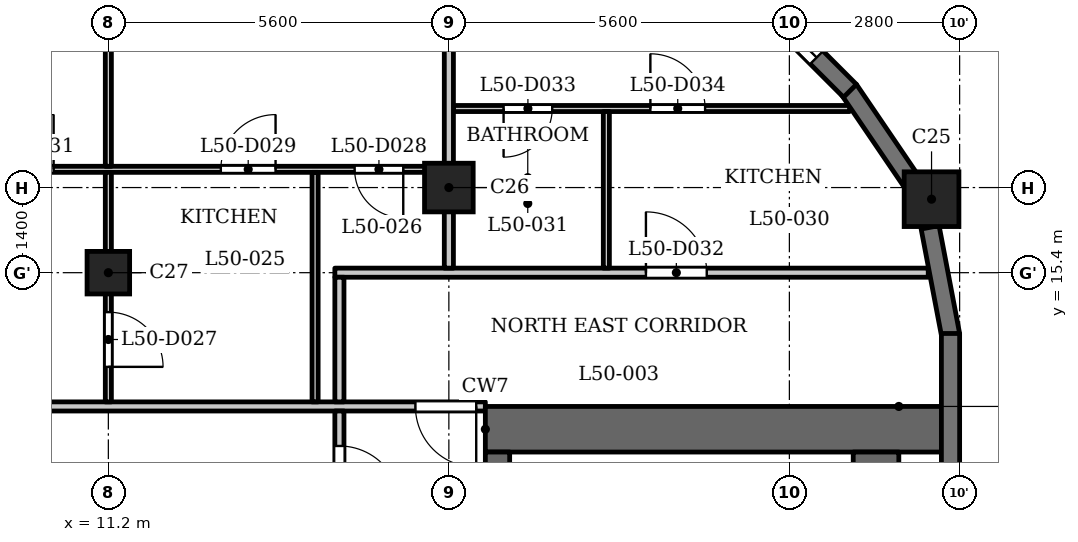
"""IFC4 building model, lengths in metres.
Left out: names, types, materials, properties, quantities, classifications, styles, units other than length and angle.
Written with IfcOpenShell. Run it as: python <this file> out.ifc"""

import sys

from ifc_helpers import new_model, si_unit, direction, frame, frame_2d, origin, origin_2d, place, context, subcontext, project, spatial, rectangle, extrude, element, fill, save


model = new_model("IFC4")
c1 = context("Model", 3, precision=1e-05, world=origin(), true_north=direction((0.0, 1.0)))
c2 = subcontext(c1, "Body", "Model", "MODEL_VIEW")
j1 = project(units=[si_unit("LENGTHUNIT", "METRE"), si_unit("PLANEANGLEUNIT", "RADIAN")], contexts=[c1])
p1 = place(None, origin())
s1 = spatial("IfcSite", under=j1, at=p1, CompositionType="ELEMENT")
p2 = place(p1, origin())
s2 = spatial("IfcBuilding", under=s1, at=p2, CompositionType="ELEMENT")
p3 = place(p2, frame((0.0, 0.0, 195.9)))
s3 = spatial("IfcBuildingStorey", under=s2, at=p3, CompositionType="ELEMENT", Elevation=195.9)
p4 = place(p3, frame((24.738, 16.609, 0.0), z_axis=(0.0, 0.0, 1.0), x_axis=(1.0, 0.0, 0.0)))
e1 = element("IfcColumn", 1, at=p4, inside=s3, PredefinedType="COLUMN", context=c2, shape_type="SweptSolid", body=[
    extrude(rectangle(XDim=0.9, YDim=0.9, at=origin_2d()), origin(), (0.0, 0.0, 1.0), 3.5),
])
p5 = place(p3, frame((16.8, 16.8, 0.0), z_axis=(0.0, 0.0, 1.0), x_axis=(1.0, 0.0, 0.0)))
e2 = element("IfcColumn", 2, at=p5, inside=s3, PredefinedType="COLUMN", context=c2, shape_type="SweptSolid", body=[
    extrude(rectangle(XDim=0.8, YDim=0.8, at=origin_2d()), origin(), (0.0, 0.0, 1.0), 3.5),
])
p6 = place(p3, frame((11.2, 15.4, 0.0), z_axis=(0.0, 0.0, 1.0), x_axis=(1.0, 0.0, 0.0)))
e3 = element("IfcColumn", 3, at=p6, inside=s3, PredefinedType="COLUMN", context=c2, shape_type="SweptSolid", body=[
    extrude(rectangle(XDim=0.7, YDim=0.7, at=origin_2d()), origin(), (0.0, 0.0, 1.0), 3.5),
])
p7 = place(p3, frame((25.05, 11.65, 0.0), z_axis=(0.0, 0.0, 1.0), x_axis=(0.0, 1.0, 0.0)))
e4 = element("IfcWall", 4, at=p7, inside=s3, PredefinedType="SOLIDWALL", context=c2, shape_type="SweptSolid", body=[
    extrude(rectangle(XDim=2.75, YDim=0.3, at=frame_2d((1.375, 0.0))), origin(), (0.0, 0.0, 1.0), 2.5),
])
for number, where, z_axis, x_axis in (
    (5, (25.053, 14.372, 0.0), (0.0, 0.0, 1.0), (-0.187, 0.982, 0.0)),
    (6, (24.394, 16.919, 0.0), (0.0, 0.0, 1.0), (-0.562, 0.827, 0.0)),
):
    element("IfcWall", number, at=place(p3, frame(where, z_axis=z_axis, x_axis=x_axis)), inside=s3, PredefinedType="SOLIDWALL", context=c2, shape_type="SweptSolid", body=[
        extrude(rectangle(XDim=1.806, YDim=0.3, at=frame_2d((0.903, 0.0))), origin(), (0.0, 0.0, 1.0), 2.5),
    ])
p8 = place(p3, frame((23.397, 18.391, 0.0), z_axis=(0.0, 0.0, 1.0), x_axis=(-0.707106781187, 0.707106781187, 0.0)))
e7 = element("IfcWall", 7, at=p8, inside=s3, PredefinedType="SOLIDWALL", context=c2, shape_type="SweptSolid", body=[
    extrude(rectangle(XDim=2.75, YDim=0.3, at=frame_2d((1.375, 0.0))), origin(), (0.0, 0.0, 1.0), 2.5),
])
p9 = place(p8, frame((0.775, 0.0, 0.6)))
e8 = element("IfcOpeningElement", 8, at=p9, cuts=e7, PredefinedType="OPENING", context=c2, shape_type="SweptSolid", body=[
    extrude(rectangle(XDim=1.2, YDim=1.55, at=frame_2d((0.6, 0.775))), frame((0.0, 0.16, 0.0), z_axis=(0.0, -1.0, 0.0), x_axis=(1.0, 0.0, 0.0)), (0.0, 0.0, 1.0), 0.32),
])
p10 = place(p3, frame((17.4, 12.825, 0.0), z_axis=(0.0, 0.0, 1.0), x_axis=(1.0, 0.0, 0.0)))
e9 = element("IfcWall", 9, at=p10, inside=s3, PredefinedType="SHEAR", context=c2, shape_type="SweptSolid", body=[
    extrude(rectangle(XDim=7.6, YDim=0.75, at=frame_2d((3.8, 0.0))), origin(), (0.0, 0.0, 1.0), 3.2),
])
p11 = place(p3, frame((17.6, -12.45, 0.0), z_axis=(0.0, 0.0, 1.0), x_axis=(0.0, 1.0, 0.0)))
e10 = element("IfcWall", 10, at=p11, inside=s3, PredefinedType="SHEAR", context=c2, shape_type="SweptSolid", body=[
    extrude(rectangle(XDim=24.9, YDim=0.4, at=frame_2d((12.45, 0.0))), origin(), (0.0, 0.0, 1.0), 3.2),
])
p12 = place(p11, frame((6.325, 0.0, 0.0)))
e11 = element("IfcOpeningElement", 11, at=p12, cuts=e10, PredefinedType="OPENING", context=c2, shape_type="SweptSolid", body=[
    extrude(rectangle(XDim=0.9, YDim=2.1, at=frame_2d((0.45, 1.05))), frame((0.0, 0.21, 0.0), z_axis=(0.0, -1.0, 0.0), x_axis=(1.0, 0.0, 0.0)), (0.0, 0.0, 1.0), 0.42),
])
p13 = place(p11, frame((9.925, 0.0, 0.0)))
e12 = element("IfcOpeningElement", 12, at=p13, cuts=e10, PredefinedType="OPENING", context=c2, shape_type="SweptSolid", body=[
    extrude(rectangle(XDim=0.9, YDim=2.1, at=frame_2d((0.45, 1.05))), frame((0.0, 0.21, 0.0), z_axis=(0.0, -1.0, 0.0), x_axis=(1.0, 0.0, 0.0)), (0.0, 0.0, 1.0), 0.42),
])
p14 = place(p11, frame((15.6, 0.0, 0.0)))
e13 = element("IfcOpeningElement", 13, at=p14, cuts=e10, PredefinedType="OPENING", context=c2, shape_type="SweptSolid", body=[
    extrude(rectangle(XDim=1.1, YDim=2.1, at=frame_2d((0.55, 1.05))), frame((0.0, 0.21, 0.0), z_axis=(0.0, -1.0, 0.0), x_axis=(1.0, 0.0, 0.0)), (0.0, 0.0, 1.0), 0.42),
])
p15 = place(p11, frame((18.0, 0.0, 0.0)))
e14 = element("IfcOpeningElement", 14, at=p15, cuts=e10, PredefinedType="OPENING", context=c2, shape_type="SweptSolid", body=[
    extrude(rectangle(XDim=1.1, YDim=2.1, at=frame_2d((0.55, 1.05))), frame((0.0, 0.21, 0.0), z_axis=(0.0, -1.0, 0.0), x_axis=(1.0, 0.0, 0.0)), (0.0, 0.0, 1.0), 0.42),
])
p16 = place(p11, frame((23.025, 0.0, 0.0)))
e15 = element("IfcOpeningElement", 15, at=p16, cuts=e10, PredefinedType="OPENING", context=c2, shape_type="SweptSolid", body=[
    extrude(rectangle(XDim=1.1, YDim=2.1, at=frame_2d((0.55, 1.05))), frame((0.0, 0.21, 0.0), z_axis=(0.0, -1.0, 0.0), x_axis=(1.0, 0.0, 0.0)), (0.0, 0.0, 1.0), 0.42),
])
p17 = place(p11, frame((0.775, 0.0, 0.0)))
e16 = element("IfcOpeningElement", 16, at=p17, cuts=e10, PredefinedType="OPENING", context=c2, shape_type="SweptSolid", body=[
    extrude(rectangle(XDim=1.1, YDim=2.1, at=frame_2d((0.55, 1.05))), frame((0.0, 0.21, 0.0), z_axis=(0.0, -1.0, 0.0), x_axis=(1.0, 0.0, 0.0)), (0.0, 0.0, 1.0), 0.42),
])
p18 = place(p11, frame((12.925, 0.0, 0.0)))
e17 = element("IfcOpeningElement", 17, at=p18, cuts=e10, PredefinedType="OPENING", context=c2, shape_type="SweptSolid", body=[
    extrude(rectangle(XDim=1.8, YDim=2.1, at=frame_2d((0.9, 1.05))), frame((0.0, 0.21, 0.0), z_axis=(0.0, -1.0, 0.0), x_axis=(1.0, 0.0, 0.0)), (0.0, 0.0, 1.0), 0.42),
])
p19 = place(p3, frame((23.825, -12.45, 0.0), z_axis=(0.0, 0.0, 1.0), x_axis=(0.0, 1.0, 0.0)))
e18 = element("IfcWall", 18, at=p19, inside=s3, PredefinedType="SHEAR", context=c2, shape_type="SweptSolid", body=[
    extrude(rectangle(XDim=24.9, YDim=0.75, at=frame_2d((12.45, 0.0))), origin(), (0.0, 0.0, 1.0), 3.2),
])
p20 = place(p3, frame((-17.4, 13.2, 0.0), z_axis=(0.0, 0.0, 1.0), x_axis=(1.0, 0.0, 0.0)))
e19 = element("IfcWall", 19, at=p20, inside=s3, PredefinedType="PARTITIONING", context=c2, shape_type="SweptSolid", body=[
    extrude(rectangle(XDim=34.8, YDim=0.15, at=frame_2d((17.4, 0.0))), origin(), (0.0, 0.0, 1.0), 3.2),
])
p21 = place(p20, frame((0.25, 0.0, 0.0)))
e20 = element("IfcOpeningElement", 20, at=p21, cuts=e19, PredefinedType="OPENING", context=c2, shape_type="SweptSolid", body=[
    extrude(rectangle(XDim=1.0, YDim=2.1, at=frame_2d((0.5, 1.05))), frame((0.0, 0.085, 0.0), z_axis=(0.0, -1.0, 0.0), x_axis=(1.0, 0.0, 0.0)), (0.0, 0.0, 1.0), 0.17),
])
p22 = place(p20, frame((33.65, 0.0, 0.0)))
e21 = element("IfcOpeningElement", 21, at=p22, cuts=e19, PredefinedType="OPENING", context=c2, shape_type="SweptSolid", body=[
    extrude(rectangle(XDim=1.0, YDim=2.1, at=frame_2d((0.5, 1.05))), frame((0.0, 0.085, 0.0), z_axis=(0.0, -1.0, 0.0), x_axis=(1.0, 0.0, 0.0)), (0.0, 0.0, 1.0), 0.17),
])
p23 = place(p20, frame((10.15, 0.0, 0.0)))
e22 = element("IfcOpeningElement", 22, at=p23, cuts=e19, PredefinedType="OPENING", context=c2, shape_type="SweptSolid", body=[
    extrude(rectangle(XDim=1.0, YDim=2.1, at=frame_2d((0.5, 1.05))), frame((0.0, 0.085, 0.0), z_axis=(0.0, -1.0, 0.0), x_axis=(1.0, 0.0, 0.0)), (0.0, 0.0, 1.0), 0.17),
])
p24 = place(p20, frame((13.55, 0.0, 0.0)))
e23 = element("IfcOpeningElement", 23, at=p24, cuts=e19, PredefinedType="OPENING", context=c2, shape_type="SweptSolid", body=[
    extrude(rectangle(XDim=1.0, YDim=2.1, at=frame_2d((0.5, 1.05))), frame((0.0, 0.085, 0.0), z_axis=(0.0, -1.0, 0.0), x_axis=(1.0, 0.0, 0.0)), (0.0, 0.0, 1.0), 0.17),
])
p25 = place(p20, frame((20.85, 0.0, 0.0)))
e24 = element("IfcOpeningElement", 24, at=p25, cuts=e19, PredefinedType="OPENING", context=c2, shape_type="SweptSolid", body=[
    extrude(rectangle(XDim=1.0, YDim=2.1, at=frame_2d((0.5, 1.05))), frame((0.0, 0.085, 0.0), z_axis=(0.0, -1.0, 0.0), x_axis=(1.0, 0.0, 0.0)), (0.0, 0.0, 1.0), 0.17),
])
p26 = place(p20, frame((23.7, 0.0, 0.0)))
e25 = element("IfcOpeningElement", 25, at=p26, cuts=e19, PredefinedType="OPENING", context=c2, shape_type="SweptSolid", body=[
    extrude(rectangle(XDim=1.0, YDim=2.1, at=frame_2d((0.5, 1.05))), frame((0.0, 0.085, 0.0), z_axis=(0.0, -1.0, 0.0), x_axis=(1.0, 0.0, 0.0)), (0.0, 0.0, 1.0), 0.17),
])
p27 = place(p3, frame((14.925, 15.4, 0.0), z_axis=(0.0, 0.0, 1.0), x_axis=(1.0, 0.0, 0.0)))
e26 = element("IfcWall", 26, at=p27, inside=s3, PredefinedType="PARTITIONING", context=c2, shape_type="SweptSolid", body=[
    extrude(rectangle(XDim=9.759, YDim=0.15, at=frame_2d((4.879, 0.0))), origin(), (0.0, 0.0, 1.0), 3.2),
])
p28 = place(p27, frame((5.116, 0.0, 0.0)))
e27 = element("IfcOpeningElement", 27, at=p28, cuts=e26, PredefinedType="OPENING", context=c2, shape_type="SweptSolid", body=[
    extrude(rectangle(XDim=1.0, YDim=2.1, at=frame_2d((0.5, 1.05))), frame((0.0, 0.085, 0.0), z_axis=(0.0, -1.0, 0.0), x_axis=(1.0, 0.0, 0.0)), (0.0, 0.0, 1.0), 0.17),
])
p29 = place(p3, frame((-16.725, 17.1, 0.0), z_axis=(0.0, 0.0, 1.0), x_axis=(1.0, 0.0, 0.0)))
e28 = element("IfcWall", 28, at=p29, inside=s3, PredefinedType="PARTITIONING", context=c2, shape_type="SweptSolid", body=[
    extrude(rectangle(XDim=33.45, YDim=0.1, at=frame_2d((16.725, 0.0))), origin(), (0.0, 0.0, 1.0), 3.2),
])
p30 = place(p29, frame((4.075, 0.0, 0.0)))
e29 = element("IfcOpeningElement", 29, at=p30, cuts=e28, PredefinedType="OPENING", context=c2, shape_type="SweptSolid", body=[
    extrude(rectangle(XDim=0.8, YDim=2.1, at=frame_2d((0.4, 1.05))), frame((0.0, 0.06, 0.0), z_axis=(0.0, -1.0, 0.0), x_axis=(1.0, 0.0, 0.0)), (0.0, 0.0, 1.0), 0.12),
])
p31 = place(p29, frame((9.575, 0.0, 0.0)))
e30 = element("IfcOpeningElement", 30, at=p31, cuts=e28, PredefinedType="OPENING", context=c2, shape_type="SweptSolid", body=[
    extrude(rectangle(XDim=0.9, YDim=2.1, at=frame_2d((0.45, 1.05))), frame((0.0, 0.06, 0.0), z_axis=(0.0, -1.0, 0.0), x_axis=(1.0, 0.0, 0.0)), (0.0, 0.0, 1.0), 0.12),
])
p32 = place(p29, frame((15.175, 0.0, 0.0)))
e31 = element("IfcOpeningElement", 31, at=p32, cuts=e28, PredefinedType="OPENING", context=c2, shape_type="SweptSolid", body=[
    extrude(rectangle(XDim=0.8, YDim=2.1, at=frame_2d((0.4, 1.05))), frame((0.0, 0.06, 0.0), z_axis=(0.0, -1.0, 0.0), x_axis=(1.0, 0.0, 0.0)), (0.0, 0.0, 1.0), 0.12),
])
p33 = place(p29, frame((12.975, 0.0, 0.0)))
e32 = element("IfcOpeningElement", 32, at=p33, cuts=e28, PredefinedType="OPENING", context=c2, shape_type="SweptSolid", body=[
    extrude(rectangle(XDim=0.9, YDim=2.1, at=frame_2d((0.45, 1.05))), frame((0.0, 0.06, 0.0), z_axis=(0.0, -1.0, 0.0), x_axis=(1.0, 0.0, 0.0)), (0.0, 0.0, 1.0), 0.12),
])
p34 = place(p29, frame((17.625, 0.0, 0.0)))
e33 = element("IfcOpeningElement", 33, at=p34, cuts=e28, PredefinedType="OPENING", context=c2, shape_type="SweptSolid", body=[
    extrude(rectangle(XDim=0.8, YDim=2.1, at=frame_2d((0.4, 1.05))), frame((0.0, 0.06, 0.0), z_axis=(0.0, -1.0, 0.0), x_axis=(1.0, 0.0, 0.0)), (0.0, 0.0, 1.0), 0.12),
])
p35 = place(p29, frame((20.025, 0.0, 0.0)))
e34 = element("IfcOpeningElement", 34, at=p35, cuts=e28, PredefinedType="OPENING", context=c2, shape_type="SweptSolid", body=[
    extrude(rectangle(XDim=0.9, YDim=2.1, at=frame_2d((0.45, 1.05))), frame((0.0, 0.06, 0.0), z_axis=(0.0, -1.0, 0.0), x_axis=(1.0, 0.0, 0.0)), (0.0, 0.0, 1.0), 0.12),
])
p36 = place(p29, frame((31.975, 0.0, 0.0)))
e35 = element("IfcOpeningElement", 35, at=p36, cuts=e28, PredefinedType="OPENING", context=c2, shape_type="SweptSolid", body=[
    extrude(rectangle(XDim=0.8, YDim=2.1, at=frame_2d((0.4, 1.05))), frame((0.0, 0.06, 0.0), z_axis=(0.0, -1.0, 0.0), x_axis=(1.0, 0.0, 0.0)), (0.0, 0.0, 1.0), 0.12),
])
p37 = place(p29, frame((29.775, 0.0, 0.0)))
e36 = element("IfcOpeningElement", 36, at=p37, cuts=e28, PredefinedType="OPENING", context=c2, shape_type="SweptSolid", body=[
    extrude(rectangle(XDim=0.9, YDim=2.1, at=frame_2d((0.45, 1.05))), frame((0.0, 0.06, 0.0), z_axis=(0.0, -1.0, 0.0), x_axis=(1.0, 0.0, 0.0)), (0.0, 0.0, 1.0), 0.12),
])
p38 = place(p29, frame((23.025, 0.0, 0.0)))
e37 = element("IfcOpeningElement", 37, at=p38, cuts=e28, PredefinedType="OPENING", context=c2, shape_type="SweptSolid", body=[
    extrude(rectangle(XDim=0.9, YDim=2.1, at=frame_2d((0.45, 1.05))), frame((0.0, 0.06, 0.0), z_axis=(0.0, -1.0, 0.0), x_axis=(1.0, 0.0, 0.0)), (0.0, 0.0, 1.0), 0.12),
])
p39 = place(p29, frame((26.125, 0.0, 0.0)))
e38 = element("IfcOpeningElement", 38, at=p39, cuts=e28, PredefinedType="OPENING", context=c2, shape_type="SweptSolid", body=[
    extrude(rectangle(XDim=0.9, YDim=2.1, at=frame_2d((0.45, 1.05))), frame((0.0, 0.06, 0.0), z_axis=(0.0, -1.0, 0.0), x_axis=(1.0, 0.0, 0.0)), (0.0, 0.0, 1.0), 0.12),
])
p40 = place(p3, frame((16.875, 18.1, 0.0), z_axis=(0.0, 0.0, 1.0), x_axis=(1.0, 0.0, 0.0)))
e39 = element("IfcWall", 39, at=p40, inside=s3, PredefinedType="PARTITIONING", context=c2, shape_type="SweptSolid", body=[
    extrude(rectangle(XDim=6.515, YDim=0.1, at=frame_2d((3.258, 0.0))), origin(), (0.0, 0.0, 1.0), 3.2),
])
p41 = place(p40, frame((0.825, 0.0, 0.0)))
e40 = element("IfcOpeningElement", 40, at=p41, cuts=e39, PredefinedType="OPENING", context=c2, shape_type="SweptSolid", body=[
    extrude(rectangle(XDim=0.8, YDim=2.1, at=frame_2d((0.4, 1.05))), frame((0.0, 0.06, 0.0), z_axis=(0.0, -1.0, 0.0), x_axis=(1.0, 0.0, 0.0)), (0.0, 0.0, 1.0), 0.12),
])
p42 = place(p40, frame((3.239, 0.0, 0.0)))
e41 = element("IfcOpeningElement", 41, at=p42, cuts=e39, PredefinedType="OPENING", context=c2, shape_type="SweptSolid", body=[
    extrude(rectangle(XDim=0.9, YDim=2.1, at=frame_2d((0.45, 1.05))), frame((0.0, 0.06, 0.0), z_axis=(0.0, -1.0, 0.0), x_axis=(1.0, 0.0, 0.0)), (0.0, 0.0, 1.0), 0.12),
])
p43 = place(p3, frame((11.2, 13.275, 0.0), z_axis=(0.0, 0.0, 1.0), x_axis=(0.0, 1.0, 0.0)))
e42 = element("IfcWall", 42, at=p43, inside=s3, PredefinedType="PARTITIONING", context=c2, shape_type="SweptSolid", body=[
    extrude(rectangle(XDim=3.775, YDim=0.1, at=frame_2d((1.888, 0.0))), origin(), (0.0, 0.0, 1.0), 3.2),
])
p44 = place(p43, frame((0.576, 0.0, 0.0)))
e43 = element("IfcOpeningElement", 43, at=p44, cuts=e42, PredefinedType="OPENING", context=c2, shape_type="SweptSolid", body=[
    extrude(rectangle(XDim=0.9, YDim=2.1, at=frame_2d((0.45, 1.05))), frame((0.0, 0.06, 0.0), z_axis=(0.0, -1.0, 0.0), x_axis=(1.0, 0.0, 0.0)), (0.0, 0.0, 1.0), 0.12),
])
p45 = place(p3, frame((11.2, 17.15, 0.0), z_axis=(0.0, 0.0, 1.0), x_axis=(0.0, 1.0, 0.0)))
e44 = element("IfcWall", 44, at=p45, inside=s3, PredefinedType="PARTITIONING", context=c2, shape_type="SweptSolid", body=[
    extrude(rectangle(XDim=4.93, YDim=0.1, at=frame_2d((2.465, 0.0))), origin(), (0.0, 0.0, 1.0), 3.2),
])
p46 = place(p3, frame((14.6, 13.275, 0.0), z_axis=(0.0, 0.0, 1.0), x_axis=(0.0, 1.0, 0.0)))
e45 = element("IfcWall", 45, at=p46, inside=s3, PredefinedType="PARTITIONING", context=c2, shape_type="SweptSolid", body=[
    extrude(rectangle(XDim=3.775, YDim=0.1, at=frame_2d((1.888, 0.0))), origin(), (0.0, 0.0, 1.0), 3.2),
])
p47 = place(p3, frame((15.0, 6.769, 0.0), z_axis=(0.0, 0.0, 1.0), x_axis=(0.0, 1.0, 0.0)))
e46 = element("IfcWall", 46, at=p47, inside=s3, PredefinedType="PARTITIONING", context=c2, shape_type="SweptSolid", body=[
    extrude(rectangle(XDim=6.356, YDim=0.15, at=frame_2d((3.178, 0.0))), origin(), (0.0, 0.0, 1.0), 3.2),
])
p48 = place(p47, frame((4.781, 0.0, 0.0)))
e47 = element("IfcOpeningElement", 47, at=p48, cuts=e46, PredefinedType="OPENING", context=c2, shape_type="SweptSolid", body=[
    extrude(rectangle(XDim=1.0, YDim=2.1, at=frame_2d((0.5, 1.05))), frame((0.0, 0.085, 0.0), z_axis=(0.0, -1.0, 0.0), x_axis=(1.0, 0.0, 0.0)), (0.0, 0.0, 1.0), 0.17),
])
p49 = place(p3, frame((15.0, 13.275, 0.0), z_axis=(0.0, 0.0, 1.0), x_axis=(0.0, 1.0, 0.0)))
e48 = element("IfcWall", 48, at=p49, inside=s3, PredefinedType="PARTITIONING", context=c2, shape_type="SweptSolid", body=[
    extrude(rectangle(XDim=2.05, YDim=0.15, at=frame_2d((1.025, 0.0))), origin(), (0.0, 0.0, 1.0), 3.2),
])
p50 = place(p3, frame((16.8, 15.475, 0.0), z_axis=(0.0, 0.0, 1.0), x_axis=(0.0, 1.0, 0.0)))
e49 = element("IfcWall", 49, at=p50, inside=s3, PredefinedType="PARTITIONING", context=c2, shape_type="SweptSolid", body=[
    extrude(rectangle(XDim=6.835, YDim=0.15, at=frame_2d((3.417, 0.0))), origin(), (0.0, 0.0, 1.0), 2.55),
])
p51 = place(p3, frame((19.39, 15.475, 0.0), z_axis=(0.0, 0.0, 1.0), x_axis=(0.0, 1.0, 0.0)))
e50 = element("IfcWall", 50, at=p51, inside=s3, PredefinedType="PARTITIONING", context=c2, shape_type="SweptSolid", body=[
    extrude(rectangle(XDim=2.575, YDim=0.1, at=frame_2d((1.288, 0.0))), origin(), (0.0, 0.0, 1.0), 3.2),
])
p52 = place(p48, origin())
e51 = element("IfcDoor", 51, at=p52, inside=s3, OperationType="SINGLE_SWING_LEFT", PredefinedType="DOOR", context=c2, shape_type="SweptSolid", body=[
    extrude(rectangle(XDim=1.0, YDim=2.1, at=frame_2d((0.5, 1.05))), frame((0.0, 0.025, 0.0), z_axis=(0.0, -1.0, 0.0), x_axis=(1.0, 0.0, 0.0)), (0.0, 0.0, 1.0), 0.05),
])
fill(e47, e51)
p53 = place(p22, origin())
e52 = element("IfcDoor", 52, at=p53, inside=s3, OperationType="SINGLE_SWING_RIGHT", PredefinedType="DOOR", context=c2, shape_type="SweptSolid", body=[
    extrude(rectangle(XDim=1.0, YDim=2.1, at=frame_2d((0.5, 1.05))), frame((0.0, 0.025, 0.0), z_axis=(0.0, -1.0, 0.0), x_axis=(1.0, 0.0, 0.0)), (0.0, 0.0, 1.0), 0.05),
])
fill(e21, e52)
p54 = place(p44, origin())
e53 = element("IfcDoor", 53, at=p54, inside=s3, OperationType="SINGLE_SWING_LEFT", PredefinedType="DOOR", context=c2, shape_type="SweptSolid", body=[
    extrude(rectangle(XDim=0.9, YDim=2.1, at=frame_2d((0.45, 1.05))), frame((0.0, 0.025, 0.0), z_axis=(0.0, -1.0, 0.0), x_axis=(1.0, 0.0, 0.0)), (0.0, 0.0, 1.0), 0.05),
])
fill(e43, e53)
p55 = place(p36, origin())
e54 = element("IfcDoor", 54, at=p55, inside=s3, OperationType="SINGLE_SWING_RIGHT", PredefinedType="DOOR", context=c2, shape_type="SweptSolid", body=[
    extrude(rectangle(XDim=0.8, YDim=2.1, at=frame_2d((0.4, 1.05))), frame((0.0, 0.025, 0.0), z_axis=(0.0, -1.0, 0.0), x_axis=(1.0, 0.0, 0.0)), (0.0, 0.0, 1.0), 0.05),
])
fill(e35, e54)
p56 = place(p37, origin())
e55 = element("IfcDoor", 55, at=p56, inside=s3, OperationType="SINGLE_SWING_LEFT", PredefinedType="DOOR", context=c2, shape_type="SweptSolid", body=[
    extrude(rectangle(XDim=0.9, YDim=2.1, at=frame_2d((0.45, 1.05))), frame((0.0, 0.025, 0.0), z_axis=(0.0, -1.0, 0.0), x_axis=(1.0, 0.0, 0.0)), (0.0, 0.0, 1.0), 0.05),
])
fill(e36, e55)
p57 = place(p39, origin())
e56 = element("IfcDoor", 56, at=p57, inside=s3, OperationType="SINGLE_SWING_LEFT", PredefinedType="DOOR", context=c2, shape_type="SweptSolid", body=[
    extrude(rectangle(XDim=0.9, YDim=2.1, at=frame_2d((0.45, 1.05))), frame((0.0, 0.025, 0.0), z_axis=(0.0, -1.0, 0.0), x_axis=(1.0, 0.0, 0.0)), (0.0, 0.0, 1.0), 0.05),
])
fill(e38, e56)
p58 = place(p28, origin())
e57 = element("IfcDoor", 57, at=p58, inside=s3, OperationType="SINGLE_SWING_RIGHT", PredefinedType="DOOR", context=c2, shape_type="SweptSolid", body=[
    extrude(rectangle(XDim=1.0, YDim=2.1, at=frame_2d((0.5, 1.05))), frame((0.0, 0.025, 0.0), z_axis=(0.0, -1.0, 0.0), x_axis=(1.0, 0.0, 0.0)), (0.0, 0.0, 1.0), 0.05),
])
fill(e27, e57)
p59 = place(p41, origin())
e58 = element("IfcDoor", 58, at=p59, inside=s3, OperationType="SINGLE_SWING_LEFT", PredefinedType="DOOR", context=c2, shape_type="SweptSolid", body=[
    extrude(rectangle(XDim=0.8, YDim=2.1, at=frame_2d((0.4, 1.05))), frame((0.0, 0.025, 0.0), z_axis=(0.0, -1.0, 0.0), x_axis=(1.0, 0.0, 0.0)), (0.0, 0.0, 1.0), 0.05),
])
fill(e40, e58)
p60 = place(p42, origin())
e59 = element("IfcDoor", 59, at=p60, inside=s3, OperationType="SINGLE_SWING_RIGHT", PredefinedType="DOOR", context=c2, shape_type="SweptSolid", body=[
    extrude(rectangle(XDim=0.9, YDim=2.1, at=frame_2d((0.45, 1.05))), frame((0.0, 0.025, 0.0), z_axis=(0.0, -1.0, 0.0), x_axis=(1.0, 0.0, 0.0)), (0.0, 0.0, 1.0), 0.05),
])
fill(e41, e59)
p61 = place(p9, origin())
e60 = element("IfcWindow", 60, at=p61, inside=s3, PartitioningType="SINGLE_PANEL", PredefinedType="WINDOW", context=c2, shape_type="SweptSolid", body=[
    extrude(rectangle(XDim=1.2, YDim=1.55, at=frame_2d((0.6, 0.775))), frame((0.0, 0.03, 0.0), z_axis=(0.0, -1.0, 0.0), x_axis=(1.0, 0.0, 0.0)), (0.0, 0.0, 1.0), 0.06),
])
fill(e8, e60)
save(model, sys.argv[1])
